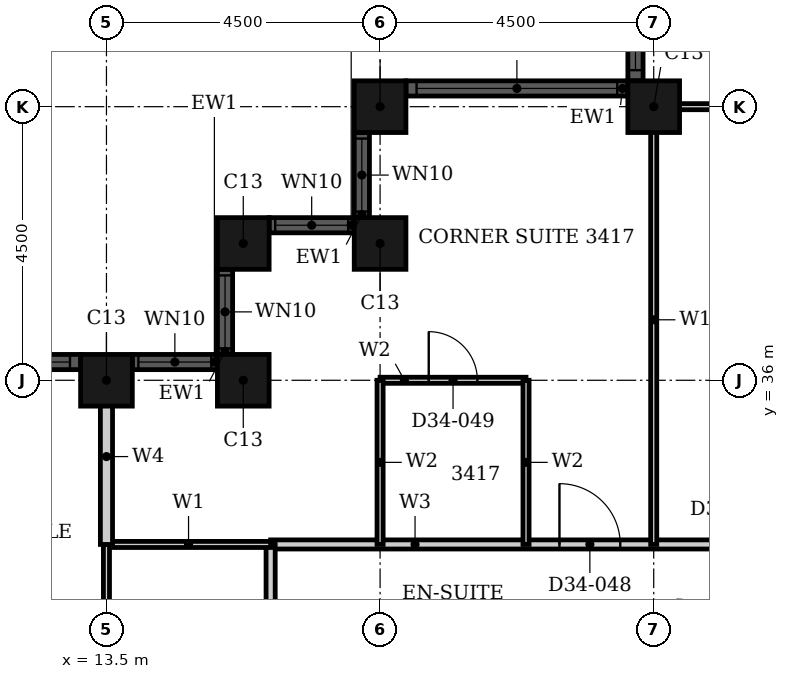
"""IFC4 building model, lengths in metres.
Left out: names, types, materials, properties, quantities, classifications, styles, units other than length and angle.
Written with IfcOpenShell. Run it as: python <this file> out.ifc"""

import sys

from ifc_helpers import new_model, si_unit, direction, frame, frame_2d, origin, origin_2d, place, context, subcontext, project, spatial, rectangle, hollow_rectangle, extrude, element, fill, save


model = new_model("IFC4")
c1 = context("Model", 3, precision=1e-05, world=origin(), true_north=direction((0.0, 1.0)))
c2 = subcontext(c1, "Body", "Model", "MODEL_VIEW")
j1 = project(units=[si_unit("LENGTHUNIT", "METRE"), si_unit("PLANEANGLEUNIT", "RADIAN")], contexts=[c1])
p1 = place(None, origin())
s1 = spatial("IfcSite", under=j1, at=p1, CompositionType="ELEMENT")
p2 = place(p1, origin())
s2 = spatial("IfcBuilding", under=s1, at=p2, CompositionType="ELEMENT")
p3 = place(p2, frame((0.0, 0.0, 136.8)))
s3 = spatial("IfcBuildingStorey", under=s2, at=p3, CompositionType="ELEMENT", Elevation=136.8)
p4 = place(p3, frame((22.5, 40.5, 0.0), z_axis=(0.0, 0.0, 1.0), x_axis=(1.0, 0.0, 0.0)))
e1 = element("IfcColumn", 1, at=p4, inside=s3, PredefinedType="COLUMN", context=c2, shape_type="SweptSolid", body=[
    extrude(hollow_rectangle(XDim=0.85, YDim=0.85, WallThickness=0.026, at=origin_2d()), origin(), (0.0, 0.0, 1.0), 3.2),
])
for number, where, z_axis, x_axis in (
    (2, (18.0, 40.5, 0.0), (0.0, 0.0, 1.0), (1.0, 0.0, 0.0)),
    (3, (18.0, 38.25, 0.0), (0.0, 0.0, 1.0), (1.0, 0.0, 0.0)),
    (4, (15.75, 38.25, 0.0), (0.0, 0.0, 1.0), (1.0, 0.0, 0.0)),
    (5, (15.75, 36.0, 0.0), (0.0, 0.0, 1.0), (1.0, 0.0, 0.0)),
    (6, (13.5, 36.0, 0.0), (0.0, 0.0, 1.0), (1.0, 0.0, 0.0)),
):
    element("IfcColumn", number, at=place(p3, frame(where, z_axis=z_axis, x_axis=x_axis)), inside=s3, PredefinedType="COLUMN", context=c2, shape_type="SweptSolid", body=[
        extrude(hollow_rectangle(XDim=0.85, YDim=0.85, WallThickness=0.026, at=origin_2d()), origin(), (0.0, 0.0, 1.0), 3.6),
    ])
p5 = place(p3, frame((22.2, 49.075, 0.0), z_axis=(0.0, 0.0, 1.0), x_axis=(0.0, -1.0, 0.0)))
e7 = element("IfcWall", 7, at=p5, inside=s3, PredefinedType="SOLIDWALL", context=c2, shape_type="SweptSolid", body=[
    extrude(rectangle(XDim=8.15, YDim=0.25, at=frame_2d((4.075, 0.0))), origin(), (0.0, 0.0, 1.0), 3.6),
])
p6 = place(p5, frame((0.175, 0.0, 0.9)))
e8 = element("IfcOpeningElement", 8, at=p6, cuts=e7, PredefinedType="OPENING", context=c2, shape_type="SweptSolid", body=[
    extrude(rectangle(XDim=3.3, YDim=2.08, at=frame_2d((1.65, 1.04))), frame((0.0, 0.135, 0.0), z_axis=(0.0, -1.0, 0.0), x_axis=(1.0, 0.0, 0.0)), (0.0, 0.0, 1.0), 0.27),
])
p7 = place(p5, frame((4.675, 0.0, 0.9)))
e9 = element("IfcOpeningElement", 9, at=p7, cuts=e7, PredefinedType="OPENING", context=c2, shape_type="SweptSolid", body=[
    extrude(rectangle(XDim=3.3, YDim=2.08, at=frame_2d((1.65, 1.04))), frame((0.0, 0.135, 0.0), z_axis=(0.0, -1.0, 0.0), x_axis=(1.0, 0.0, 0.0)), (0.0, 0.0, 1.0), 0.27),
])
p8 = place(p3, frame((22.075, 40.8, 0.0), z_axis=(0.0, 0.0, 1.0), x_axis=(-1.0, 0.0, 0.0)))
e10 = element("IfcWall", 10, at=p8, inside=s3, PredefinedType="SOLIDWALL", context=c2, shape_type="SweptSolid", body=[
    extrude(rectangle(XDim=3.65, YDim=0.25, at=frame_2d((1.825, 0.0))), origin(), (0.0, 0.0, 1.0), 3.6),
])
p9 = place(p8, frame((0.175, 0.0, 0.9)))
e11 = element("IfcOpeningElement", 11, at=p9, cuts=e10, PredefinedType="OPENING", context=c2, shape_type="SweptSolid", body=[
    extrude(rectangle(XDim=3.3, YDim=1.35, at=frame_2d((1.65, 0.675))), frame((0.0, 0.135, 0.0), z_axis=(0.0, -1.0, 0.0), x_axis=(1.0, 0.0, 0.0)), (0.0, 0.0, 1.0), 0.27),
])
p10 = place(p3, frame((17.7, 40.075, 0.0), z_axis=(0.0, 0.0, 1.0), x_axis=(0.0, -1.0, 0.0)))
e12 = element("IfcWall", 12, at=p10, inside=s3, PredefinedType="SOLIDWALL", context=c2, shape_type="SweptSolid", body=[
    extrude(rectangle(XDim=1.4, YDim=0.25, at=frame_2d((0.7, 0.0))), origin(), (0.0, 0.0, 1.0), 3.6),
])
p11 = place(p10, frame((0.1, 0.0, 0.9)))
e13 = element("IfcOpeningElement", 13, at=p11, cuts=e12, PredefinedType="OPENING", context=c2, shape_type="SweptSolid", body=[
    extrude(rectangle(XDim=1.2, YDim=1.85, at=frame_2d((0.6, 0.925))), frame((0.0, 0.135, 0.0), z_axis=(0.0, -1.0, 0.0), x_axis=(1.0, 0.0, 0.0)), (0.0, 0.0, 1.0), 0.27),
])
p12 = place(p3, frame((17.575, 38.55, 0.0), z_axis=(0.0, 0.0, 1.0), x_axis=(-1.0, 0.0, 0.0)))
e14 = element("IfcWall", 14, at=p12, inside=s3, PredefinedType="SOLIDWALL", context=c2, shape_type="SweptSolid", body=[
    extrude(rectangle(XDim=1.4, YDim=0.25, at=frame_2d((0.7, 0.0))), origin(), (0.0, 0.0, 1.0), 3.6),
])
p13 = place(p12, frame((0.1, 0.0, 0.9)))
e15 = element("IfcOpeningElement", 15, at=p13, cuts=e14, PredefinedType="OPENING", context=c2, shape_type="SweptSolid", body=[
    extrude(rectangle(XDim=1.2, YDim=1.85, at=frame_2d((0.6, 0.925))), frame((0.0, 0.135, 0.0), z_axis=(0.0, -1.0, 0.0), x_axis=(1.0, 0.0, 0.0)), (0.0, 0.0, 1.0), 0.27),
])
p14 = place(p3, frame((15.45, 37.825, 0.0), z_axis=(0.0, 0.0, 1.0), x_axis=(0.0, -1.0, 0.0)))
e16 = element("IfcWall", 16, at=p14, inside=s3, PredefinedType="SOLIDWALL", context=c2, shape_type="SweptSolid", body=[
    extrude(rectangle(XDim=1.4, YDim=0.25, at=frame_2d((0.7, 0.0))), origin(), (0.0, 0.0, 1.0), 3.6),
])
p15 = place(p14, frame((0.1, 0.0, 0.9)))
e17 = element("IfcOpeningElement", 17, at=p15, cuts=e16, PredefinedType="OPENING", context=c2, shape_type="SweptSolid", body=[
    extrude(rectangle(XDim=1.2, YDim=1.85, at=frame_2d((0.6, 0.925))), frame((0.0, 0.135, 0.0), z_axis=(0.0, -1.0, 0.0), x_axis=(1.0, 0.0, 0.0)), (0.0, 0.0, 1.0), 0.27),
])
p16 = place(p3, frame((15.325, 36.3, 0.0), z_axis=(0.0, 0.0, 1.0), x_axis=(-1.0, 0.0, 0.0)))
e18 = element("IfcWall", 18, at=p16, inside=s3, PredefinedType="SOLIDWALL", context=c2, shape_type="SweptSolid", body=[
    extrude(rectangle(XDim=1.4, YDim=0.25, at=frame_2d((0.7, 0.0))), origin(), (0.0, 0.0, 1.0), 3.6),
])
p17 = place(p16, frame((0.1, 0.0, 0.9)))
e19 = element("IfcOpeningElement", 19, at=p17, cuts=e18, PredefinedType="OPENING", context=c2, shape_type="SweptSolid", body=[
    extrude(rectangle(XDim=1.2, YDim=1.85, at=frame_2d((0.6, 0.925))), frame((0.0, 0.135, 0.0), z_axis=(0.0, -1.0, 0.0), x_axis=(1.0, 0.0, 0.0)), (0.0, 0.0, 1.0), 0.27),
])
p18 = place(p3, frame((13.075, 36.3, 0.0), z_axis=(0.0, 0.0, 1.0), x_axis=(-1.0, 0.0, 0.0)))
e20 = element("IfcWall", 20, at=p18, inside=s3, PredefinedType="SOLIDWALL", context=c2, shape_type="SweptSolid", body=[
    extrude(rectangle(XDim=8.15, YDim=0.25, at=frame_2d((4.075, 0.0))), origin(), (0.0, 0.0, 1.0), 3.6),
])
p19 = place(p18, frame((0.175, 0.0, 0.9)))
e21 = element("IfcOpeningElement", 21, at=p19, cuts=e20, PredefinedType="OPENING", context=c2, shape_type="SweptSolid", body=[
    extrude(rectangle(XDim=3.3, YDim=1.85, at=frame_2d((1.65, 0.925))), frame((0.0, 0.135, 0.0), z_axis=(0.0, -1.0, 0.0), x_axis=(1.0, 0.0, 0.0)), (0.0, 0.0, 1.0), 0.27),
])
p20 = place(p18, frame((4.675, 0.0, 0.9)))
e22 = element("IfcOpeningElement", 22, at=p20, cuts=e20, PredefinedType="OPENING", context=c2, shape_type="SweptSolid", body=[
    extrude(rectangle(XDim=3.3, YDim=1.85, at=frame_2d((1.65, 0.925))), frame((0.0, 0.135, 0.0), z_axis=(0.0, -1.0, 0.0), x_axis=(1.0, 0.0, 0.0)), (0.0, 0.0, 1.0), 0.27),
])
p21 = place(p3, frame((16.2, 33.3, 0.0), z_axis=(0.0, 0.0, 1.0), x_axis=(1.0, 0.0, 0.0)))
e23 = element("IfcWall", 23, at=p21, inside=s3, PredefinedType="PARTITIONING", context=c2, shape_type="SweptSolid", body=[
    extrude(rectangle(XDim=15.3, YDim=0.15, at=frame_2d((7.65, 0.0))), origin(), (0.0, 0.0, 1.0), 3.2),
])
p22 = place(p21, frame((4.75, 0.0, 0.0)))
e24 = element("IfcOpeningElement", 24, at=p22, cuts=e23, PredefinedType="OPENING", context=c2, shape_type="SweptSolid", body=[
    extrude(rectangle(XDim=1.0, YDim=2.1, at=frame_2d((0.5, 1.05))), frame((0.0, 0.085, 0.0), z_axis=(0.0, -1.0, 0.0), x_axis=(1.0, 0.0, 0.0)), (0.0, 0.0, 1.0), 0.17),
])
p23 = place(p21, frame((10.35, 0.0, 0.0)))
e25 = element("IfcOpeningElement", 25, at=p23, cuts=e23, PredefinedType="OPENING", context=c2, shape_type="SweptSolid", body=[
    extrude(rectangle(XDim=0.9, YDim=2.1, at=frame_2d((0.45, 1.05))), frame((0.0, 0.085, 0.0), z_axis=(0.0, -1.0, 0.0), x_axis=(1.0, 0.0, 0.0)), (0.0, 0.0, 1.0), 0.17),
])
p24 = place(p3, frame((16.2, 27.0, 0.0), z_axis=(0.0, 0.0, 1.0), x_axis=(0.0, 1.0, 0.0)))
e26 = element("IfcWall", 26, at=p24, inside=s3, PredefinedType="PARTITIONING", context=c2, shape_type="SweptSolid", body=[
    extrude(rectangle(XDim=6.3, YDim=0.15, at=frame_2d((3.15, 0.0))), origin(), (0.0, 0.0, 1.0), 3.2),
])
p25 = place(p24, frame((2.525, 0.0, 0.0)))
e27 = element("IfcOpeningElement", 27, at=p25, cuts=e26, PredefinedType="OPENING", context=c2, shape_type="SweptSolid", body=[
    extrude(rectangle(XDim=0.95, YDim=2.1, at=frame_2d((0.475, 1.05))), frame((0.0, 0.085, 0.0), z_axis=(0.0, -1.0, 0.0), x_axis=(1.0, 0.0, 0.0)), (0.0, 0.0, 1.0), 0.17),
])
p26 = place(p3, frame((13.5, 33.3, 0.0), z_axis=(0.0, 0.0, 1.0), x_axis=(1.0, 0.0, 0.0)))
e28 = element("IfcWall", 28, at=p26, inside=s3, PredefinedType="PARTITIONING", context=c2, shape_type="SweptSolid", body=[
    extrude(rectangle(XDim=2.7, YDim=0.1, at=frame_2d((1.35, 0.0))), origin(), (0.0, 0.0, 1.0), 3.2),
])
p27 = place(p3, frame((22.31, 40.5, 0.0), z_axis=(0.0, 0.0, 1.0), x_axis=(1.0, 0.0, 0.0)))
e29 = element("IfcWall", 29, at=p27, inside=s3, PredefinedType="PARTITIONING", context=c2, shape_type="SweptSolid", body=[
    extrude(rectangle(XDim=9.19, YDim=0.1, at=frame_2d((4.595, 0.0))), origin(), (0.0, 0.0, 1.0), 2.268),
])
p28 = place(p3, frame((13.5, 27.0, 0.0), z_axis=(0.0, 0.0, 1.0), x_axis=(0.0, 1.0, 0.0)))
e30 = element("IfcWall", 30, at=p28, inside=s3, PredefinedType="PARTITIONING", context=c2, shape_type="SweptSolid", body=[
    extrude(rectangle(XDim=6.3, YDim=0.1, at=frame_2d((3.15, 0.0))), origin(), (0.0, 0.0, 1.0), 2.28),
])
p29 = place(p3, frame((22.5, 33.3, 0.0), z_axis=(0.0, 0.0, 1.0), x_axis=(0.0, 1.0, 0.0)))
e31 = element("IfcWall", 31, at=p29, inside=s3, PredefinedType="PARTITIONING", context=c2, shape_type="SweptSolid", body=[
    extrude(rectangle(XDim=7.39, YDim=0.1, at=frame_2d((3.695, 0.0))), origin(), (0.0, 0.0, 1.0), 3.2),
])
p30 = place(p3, frame((13.5, 33.3, 0.0), z_axis=(0.0, 0.0, 1.0), x_axis=(0.0, 1.0, 0.0)))
e32 = element("IfcWall", 32, at=p30, inside=s3, PredefinedType="PARTITIONING", context=c2, shape_type="SweptSolid", body=[
    extrude(rectangle(XDim=2.89, YDim=0.2, at=frame_2d((1.445, 0.0))), origin(), (0.0, 0.0, 1.0), 2.28),
])
p31 = place(p3, frame((18.0, 36.0, 0.0), z_axis=(0.0, 0.0, 1.0), x_axis=(1.0, 0.0, 0.0)))
e33 = element("IfcWall", 33, at=p31, inside=s3, PredefinedType="PARTITIONING", context=c2, shape_type="SweptSolid", body=[
    extrude(rectangle(XDim=2.4, YDim=0.1, at=frame_2d((1.2, 0.0))), origin(), (0.0, 0.0, 1.0), 3.2),
])
p32 = place(p31, frame((0.8, 0.0, 0.0)))
e34 = element("IfcOpeningElement", 34, at=p32, cuts=e33, PredefinedType="OPENING", context=c2, shape_type="SweptSolid", body=[
    extrude(rectangle(XDim=0.8, YDim=2.1, at=frame_2d((0.4, 1.05))), frame((0.0, 0.06, 0.0), z_axis=(0.0, -1.0, 0.0), x_axis=(1.0, 0.0, 0.0)), (0.0, 0.0, 1.0), 0.12),
])
for number, where, z_axis, x_axis in (
    (35, (18.0, 33.3, 0.0), (0.0, 0.0, 1.0), (0.0, 1.0, 0.0)),
    (36, (20.4, 33.3, 0.0), (0.0, 0.0, 1.0), (0.0, 1.0, 0.0)),
):
    element("IfcWall", number, at=place(p3, frame(where, z_axis=z_axis, x_axis=x_axis)), inside=s3, PredefinedType="PARTITIONING", context=c2, shape_type="SweptSolid", body=[
        extrude(rectangle(XDim=2.7, YDim=0.1, at=frame_2d((1.35, 0.0))), origin(), (0.0, 0.0, 1.0), 3.2),
    ])
p33 = place(p7, origin())
e37 = element("IfcWindow", 37, at=p33, inside=s3, PartitioningType="SINGLE_PANEL", PredefinedType="WINDOW", context=c2, shape_type="SweptSolid", body=[
    extrude(rectangle(XDim=3.3, YDim=2.08, at=frame_2d((1.65, 1.04))), frame((0.0, 0.03, 0.0), z_axis=(0.0, -1.0, 0.0), x_axis=(1.0, 0.0, 0.0)), (0.0, 0.0, 1.0), 0.06),
])
fill(e9, e37)
p34 = place(p9, origin())
e38 = element("IfcWindow", 38, at=p34, inside=s3, PartitioningType="SINGLE_PANEL", PredefinedType="WINDOW", context=c2, shape_type="SweptSolid", body=[
    extrude(rectangle(XDim=3.3, YDim=1.35, at=frame_2d((1.65, 0.675))), frame((0.0, 0.03, 0.0), z_axis=(0.0, -1.0, 0.0), x_axis=(1.0, 0.0, 0.0)), (0.0, 0.0, 1.0), 0.06),
])
fill(e11, e38)
p35 = place(p11, origin())
e39 = element("IfcWindow", 39, at=p35, inside=s3, PartitioningType="SINGLE_PANEL", PredefinedType="WINDOW", context=c2, shape_type="SweptSolid", body=[
    extrude(rectangle(XDim=1.2, YDim=1.85, at=frame_2d((0.6, 0.925))), frame((0.0, 0.03, 0.0), z_axis=(0.0, -1.0, 0.0), x_axis=(1.0, 0.0, 0.0)), (0.0, 0.0, 1.0), 0.06),
])
fill(e13, e39)
p36 = place(p13, origin())
e40 = element("IfcWindow", 40, at=p36, inside=s3, PartitioningType="SINGLE_PANEL", PredefinedType="WINDOW", context=c2, shape_type="SweptSolid", body=[
    extrude(rectangle(XDim=1.2, YDim=1.85, at=frame_2d((0.6, 0.925))), frame((0.0, 0.03, 0.0), z_axis=(0.0, -1.0, 0.0), x_axis=(1.0, 0.0, 0.0)), (0.0, 0.0, 1.0), 0.06),
])
fill(e15, e40)
p37 = place(p15, origin())
e41 = element("IfcWindow", 41, at=p37, inside=s3, PartitioningType="SINGLE_PANEL", PredefinedType="WINDOW", context=c2, shape_type="SweptSolid", body=[
    extrude(rectangle(XDim=1.2, YDim=1.85, at=frame_2d((0.6, 0.925))), frame((0.0, 0.03, 0.0), z_axis=(0.0, -1.0, 0.0), x_axis=(1.0, 0.0, 0.0)), (0.0, 0.0, 1.0), 0.06),
])
fill(e17, e41)
p38 = place(p17, origin())
e42 = element("IfcWindow", 42, at=p38, inside=s3, PartitioningType="SINGLE_PANEL", PredefinedType="WINDOW", context=c2, shape_type="SweptSolid", body=[
    extrude(rectangle(XDim=1.2, YDim=1.85, at=frame_2d((0.6, 0.925))), frame((0.0, 0.03, 0.0), z_axis=(0.0, -1.0, 0.0), x_axis=(1.0, 0.0, 0.0)), (0.0, 0.0, 1.0), 0.06),
])
fill(e19, e42)
p39 = place(p19, origin())
e43 = element("IfcWindow", 43, at=p39, inside=s3, PartitioningType="SINGLE_PANEL", PredefinedType="WINDOW", context=c2, shape_type="SweptSolid", body=[
    extrude(rectangle(XDim=3.3, YDim=1.85, at=frame_2d((1.65, 0.925))), frame((0.0, 0.03, 0.0), z_axis=(0.0, -1.0, 0.0), x_axis=(1.0, 0.0, 0.0)), (0.0, 0.0, 1.0), 0.06),
])
fill(e21, e43)
p40 = place(p22, origin())
e44 = element("IfcDoor", 44, at=p40, inside=s3, OperationType="SINGLE_SWING_RIGHT", PredefinedType="DOOR", context=c2, shape_type="SweptSolid", body=[
    extrude(rectangle(XDim=1.0, YDim=2.1, at=frame_2d((0.5, 1.05))), frame((0.0, 0.025, 0.0), z_axis=(0.0, -1.0, 0.0), x_axis=(1.0, 0.0, 0.0)), (0.0, 0.0, 1.0), 0.05),
])
fill(e24, e44)
p41 = place(p32, origin())
e45 = element("IfcDoor", 45, at=p41, inside=s3, OperationType="SINGLE_SWING_LEFT", PredefinedType="DOOR", context=c2, shape_type="SweptSolid", body=[
    extrude(rectangle(XDim=0.8, YDim=2.1, at=frame_2d((0.4, 1.05))), frame((0.0, 0.025, 0.0), z_axis=(0.0, -1.0, 0.0), x_axis=(1.0, 0.0, 0.0)), (0.0, 0.0, 1.0), 0.05),
])
fill(e34, e45)
save(model, sys.argv[1])
